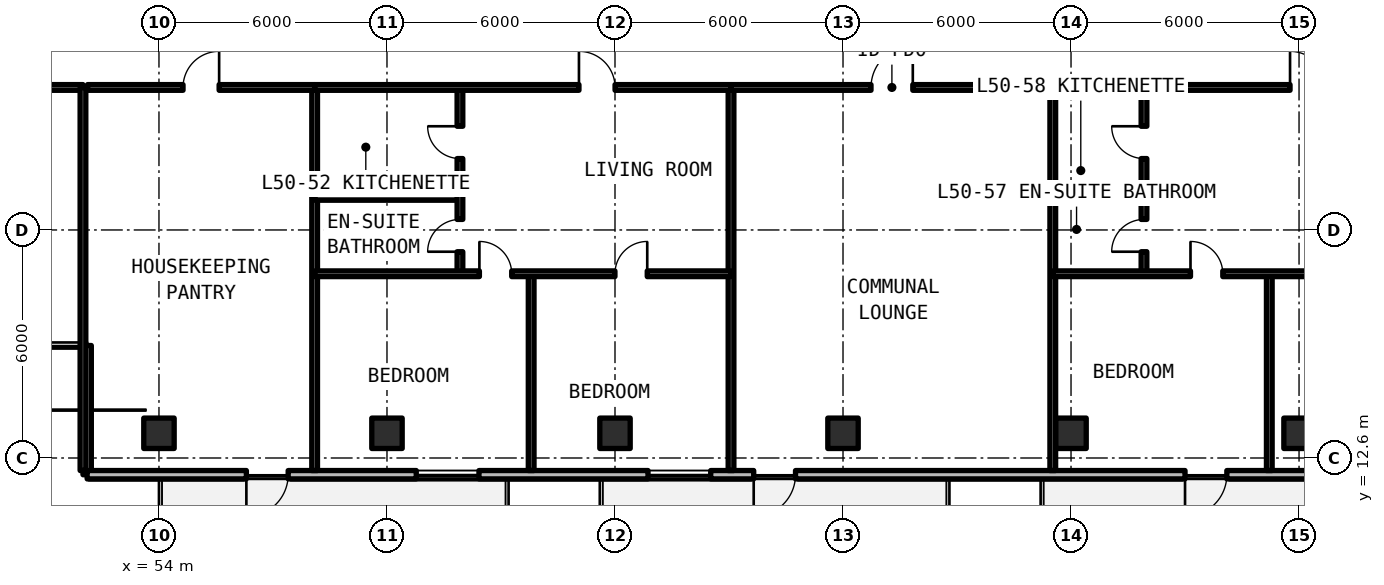
"""IFC4 building model, lengths in metres.
Left out: names, types, materials, properties, quantities, classifications, styles, units other than length and angle.
Written with IfcOpenShell. Run it as: python <this file> out.ifc"""

import sys

from ifc_helpers import new_model, si_unit, direction, frame, frame_2d, origin, origin_2d, place, context, subcontext, project, spatial, rectangle, extrude, element, fill, save


model = new_model("IFC4")
c1 = context("Model", 3, precision=1e-05, world=origin(), true_north=direction((0.0, 1.0)))
c2 = subcontext(c1, "Body", "Model", "MODEL_VIEW")
j1 = project(units=[si_unit("LENGTHUNIT", "METRE"), si_unit("PLANEANGLEUNIT", "RADIAN")], contexts=[c1])
p1 = place(None, origin())
s1 = spatial("IfcSite", under=j1, at=p1, CompositionType="ELEMENT")
p2 = place(p1, origin())
s2 = spatial("IfcBuilding", under=s1, at=p2, CompositionType="ELEMENT")
p3 = place(p2, frame((0.0, 0.0, 181.83)))
s3 = spatial("IfcBuildingStorey", under=s2, at=p3, CompositionType="ELEMENT", Elevation=181.83)
for number, where, z_axis, x_axis in (
    (1, (54.0, 13.25, 0.0), (0.0, 0.0, 1.0), (1.0, 0.0, 0.0)),
    (2, (60.0, 13.25, 0.0), (0.0, 0.0, 1.0), (1.0, 0.0, 0.0)),
    (3, (66.0, 13.25, 0.0), (0.0, 0.0, 1.0), (1.0, 0.0, 0.0)),
    (4, (72.0, 13.25, 0.0), (0.0, 0.0, 1.0), (1.0, 0.0, 0.0)),
    (5, (78.0, 13.25, 0.0), (0.0, 0.0, 1.0), (1.0, 0.0, 0.0)),
    (6, (84.0, 13.25, 0.0), (0.0, 0.0, 1.0), (1.0, 0.0, 0.0)),
):
    element("IfcColumn", number, at=place(p3, frame(where, z_axis=z_axis, x_axis=x_axis)), inside=s3, PredefinedType="COLUMN", context=c2, shape_type="SweptSolid", body=[
        extrude(rectangle(XDim=0.8, YDim=0.8, at=origin_2d()), origin(), (0.0, 0.0, 1.0), 3.3),
    ])
p4 = place(p3, frame((52.11, 15.56, 0.0), z_axis=(0.0, 0.0, 1.0), x_axis=(0.0, -1.0, 0.0)))
e7 = element("IfcWall", 7, at=p4, inside=s3, PredefinedType="SOLIDWALL", context=c2, shape_type="SweptSolid", body=[
    extrude(rectangle(XDim=3.4, YDim=0.22, at=frame_2d((1.7, 0.0))), origin(), (0.0, 0.0, 1.0), 3.08),
])
p5 = place(p3, frame((52.11, 12.16, 0.0), z_axis=(0.0, 0.0, 1.0), x_axis=(1.0, 0.0, 0.0)))
e8 = element("IfcWall", 8, at=p5, inside=s3, PredefinedType="SOLIDWALL", context=c2, shape_type="SweptSolid", body=[
    extrude(rectangle(XDim=43.244, YDim=0.22, at=frame_2d((21.622, 0.0))), origin(), (0.0, 0.0, 1.0), 3.08),
])
p6 = place(p5, frame((4.19, 0.0, 0.0)))
e9 = element("IfcOpeningElement", 9, at=p6, cuts=e8, PredefinedType="OPENING", context=c2, shape_type="SweptSolid", body=[
    extrude(rectangle(XDim=1.1, YDim=2.15, at=frame_2d((0.55, 1.075))), frame((0.0, 0.12, 0.0), z_axis=(0.0, -1.0, 0.0), x_axis=(1.0, 0.0, 0.0)), (0.0, 0.0, 1.0), 0.24),
])
p7 = place(p5, frame((17.54, 0.0, 0.0)))
e10 = element("IfcOpeningElement", 10, at=p7, cuts=e8, PredefinedType="OPENING", context=c2, shape_type="SweptSolid", body=[
    extrude(rectangle(XDim=1.1, YDim=2.15, at=frame_2d((0.55, 1.075))), frame((0.0, 0.12, 0.0), z_axis=(0.0, -1.0, 0.0), x_axis=(1.0, 0.0, 0.0)), (0.0, 0.0, 1.0), 0.24),
])
p8 = place(p5, frame((28.89, 0.0, 0.0)))
e11 = element("IfcOpeningElement", 11, at=p8, cuts=e8, PredefinedType="OPENING", context=c2, shape_type="SweptSolid", body=[
    extrude(rectangle(XDim=1.1, YDim=2.15, at=frame_2d((0.55, 1.075))), frame((0.0, 0.12, 0.0), z_axis=(0.0, -1.0, 0.0), x_axis=(1.0, 0.0, 0.0)), (0.0, 0.0, 1.0), 0.24),
])
p9 = place(p5, frame((8.66, 0.0, 0.78)))
e12 = element("IfcOpeningElement", 12, at=p9, cuts=e8, PredefinedType="OPENING", context=c2, shape_type="SweptSolid", body=[
    extrude(rectangle(XDim=1.65, YDim=1.66, at=frame_2d((0.825, 0.83))), frame((0.0, 0.12, 0.0), z_axis=(0.0, -1.0, 0.0), x_axis=(1.0, 0.0, 0.0)), (0.0, 0.0, 1.0), 0.24),
])
p10 = place(p5, frame((14.759, 0.0, 0.78)))
e13 = element("IfcOpeningElement", 13, at=p10, cuts=e8, PredefinedType="OPENING", context=c2, shape_type="SweptSolid", body=[
    extrude(rectangle(XDim=1.65, YDim=1.66, at=frame_2d((0.825, 0.83))), frame((0.0, 0.12, 0.0), z_axis=(0.0, -1.0, 0.0), x_axis=(1.0, 0.0, 0.0)), (0.0, 0.0, 1.0), 0.24),
])
p11 = place(p5, frame((32.902, 0.0, 0.78)))
e14 = element("IfcOpeningElement", 14, at=p11, cuts=e8, PredefinedType="OPENING", context=c2, shape_type="SweptSolid", body=[
    extrude(rectangle(XDim=1.65, YDim=1.66, at=frame_2d((0.825, 0.83))), frame((0.0, 0.12, 0.0), z_axis=(0.0, -1.0, 0.0), x_axis=(1.0, 0.0, 0.0)), (0.0, 0.0, 1.0), 0.24),
])
p12 = place(p5, frame((38.313, 0.0, 0.78)))
e15 = element("IfcOpeningElement", 15, at=p12, cuts=e8, PredefinedType="OPENING", context=c2, shape_type="SweptSolid", body=[
    extrude(rectangle(XDim=0.85, YDim=1.65, at=frame_2d((0.425, 0.825))), frame((0.0, 0.12, 0.0), z_axis=(0.0, -1.0, 0.0), x_axis=(1.0, 0.0, 0.0)), (0.0, 0.0, 1.0), 0.24),
])
p13 = place(p5, frame((40.615, 0.0, 0.78)))
e16 = element("IfcOpeningElement", 16, at=p13, cuts=e8, PredefinedType="OPENING", context=c2, shape_type="SweptSolid", body=[
    extrude(rectangle(XDim=1.65, YDim=1.66, at=frame_2d((0.825, 0.83))), frame((0.0, 0.12, 0.0), z_axis=(0.0, -1.0, 0.0), x_axis=(1.0, 0.0, 0.0)), (0.0, 0.0, 1.0), 0.24),
])
p14 = place(p3, frame((43.6, 22.35, 0.0), z_axis=(0.0, 0.0, 1.0), x_axis=(1.0, 0.0, 0.0)))
e17 = element("IfcWall", 17, at=p14, inside=s3, PredefinedType="SOLIDWALL", context=c2, shape_type="SweptSolid", body=[
    extrude(rectangle(XDim=8.4, YDim=0.15, at=frame_2d((4.2, 0.0))), origin(), (0.0, 0.0, 1.0), 2.35),
])
p15 = place(p14, frame((3.65, 0.0, 0.0)))
e18 = element("IfcOpeningElement", 18, at=p15, cuts=e17, PredefinedType="OPENING", context=c2, shape_type="SweptSolid", body=[
    extrude(rectangle(XDim=1.1, YDim=2.15, at=frame_2d((0.55, 1.075))), frame((0.0, 0.085, 0.0), z_axis=(0.0, -1.0, 0.0), x_axis=(1.0, 0.0, 0.0)), (0.0, 0.0, 1.0), 0.17),
])
for number, where, z_axis, x_axis in (
    (19, (52.0, 12.27, 0.0), (0.0, 0.0, 1.0), (0.0, 1.0, 0.0)),
    (20, (58.096, 12.27, 0.0), (0.0, 0.0, 1.0), (0.0, 1.0, 0.0)),
):
    element("IfcWall", number, at=place(p3, frame(where, z_axis=z_axis, x_axis=x_axis)), inside=s3, PredefinedType="SOLIDWALL", context=c2, shape_type="SweptSolid", body=[
        extrude(rectangle(XDim=10.08, YDim=0.15, at=frame_2d((5.04, 0.0))), origin(), (0.0, 0.0, 1.0), 2.35),
    ])
p16 = place(p3, frame((52.12, 22.35, 0.0), z_axis=(0.0, 0.0, 1.0), x_axis=(1.0, 0.0, 0.0)))
e21 = element("IfcWall", 21, at=p16, inside=s3, PredefinedType="SOLIDWALL", context=c2, shape_type="SweptSolid", body=[
    extrude(rectangle(XDim=5.976, YDim=0.15, at=frame_2d((2.988, 0.0))), origin(), (0.0, 0.0, 1.0), 2.35),
])
p17 = place(p16, frame((2.513, 0.0, 0.0)))
e22 = element("IfcOpeningElement", 22, at=p17, cuts=e21, PredefinedType="OPENING", context=c2, shape_type="SweptSolid", body=[
    extrude(rectangle(XDim=0.95, YDim=2.15, at=frame_2d((0.475, 1.075))), frame((0.0, 0.085, 0.0), z_axis=(0.0, -1.0, 0.0), x_axis=(1.0, 0.0, 0.0)), (0.0, 0.0, 1.0), 0.17),
])
p18 = place(p3, frame((69.053, 12.27, 0.0), z_axis=(0.0, 0.0, 1.0), x_axis=(0.0, 1.0, 0.0)))
e23 = element("IfcWall", 23, at=p18, inside=s3, PredefinedType="SOLIDWALL", context=c2, shape_type="SweptSolid", body=[
    extrude(rectangle(XDim=10.08, YDim=0.15, at=frame_2d((5.04, 0.0))), origin(), (0.0, 0.0, 1.0), 2.35),
])
p19 = place(p3, frame((58.096, 19.458, 0.0), z_axis=(0.0, 0.0, 1.0), x_axis=(1.0, 0.0, 0.0)))
e24 = element("IfcWall", 24, at=p19, inside=s3, PredefinedType="PARTITIONING", context=c2, shape_type="SweptSolid", body=[
    extrude(rectangle(XDim=3.823, YDim=0.15, at=frame_2d((1.912, 0.0))), origin(), (0.0, 0.0, 1.0), 2.35),
])
p20 = place(p3, frame((61.92, 17.448, 0.0), z_axis=(0.0, 0.0, 1.0), x_axis=(0.0, 1.0, 0.0)))
e25 = element("IfcWall", 25, at=p20, inside=s3, PredefinedType="PARTITIONING", context=c2, shape_type="SweptSolid", body=[
    extrude(rectangle(XDim=4.902, YDim=0.15, at=frame_2d((2.451, 0.0))), origin(), (0.0, 0.0, 1.0), 2.35),
])
p21 = place(p20, frame((0.58, 0.0, 0.0)))
e26 = element("IfcOpeningElement", 26, at=p21, cuts=e25, PredefinedType="OPENING", context=c2, shape_type="SweptSolid", body=[
    extrude(rectangle(XDim=0.85, YDim=2.1, at=frame_2d((0.425, 1.05))), frame((0.0, 0.085, 0.0), z_axis=(0.0, -1.0, 0.0), x_axis=(1.0, 0.0, 0.0)), (0.0, 0.0, 1.0), 0.17),
])
p22 = place(p20, frame((3.031, 0.0, 0.0)))
e27 = element("IfcOpeningElement", 27, at=p22, cuts=e25, PredefinedType="OPENING", context=c2, shape_type="SweptSolid", body=[
    extrude(rectangle(XDim=0.85, YDim=2.1, at=frame_2d((0.425, 1.05))), frame((0.0, 0.085, 0.0), z_axis=(0.0, -1.0, 0.0), x_axis=(1.0, 0.0, 0.0)), (0.0, 0.0, 1.0), 0.17),
])
p23 = place(p3, frame((63.794, 12.27, 0.0), z_axis=(0.0, 0.0, 1.0), x_axis=(0.0, 1.0, 0.0)))
e28 = element("IfcWall", 28, at=p23, inside=s3, PredefinedType="PARTITIONING", context=c2, shape_type="SweptSolid", body=[
    extrude(rectangle(XDim=5.178, YDim=0.15, at=frame_2d((2.589, 0.0))), origin(), (0.0, 0.0, 1.0), 2.35),
])
p24 = place(p3, frame((58.096, 17.448, 0.0), z_axis=(0.0, 0.0, 1.0), x_axis=(1.0, 0.0, 0.0)))
e29 = element("IfcWall", 29, at=p24, inside=s3, PredefinedType="PARTITIONING", context=c2, shape_type="SweptSolid", body=[
    extrude(rectangle(XDim=10.957, YDim=0.15, at=frame_2d((5.479, 0.0))), origin(), (0.0, 0.0, 1.0), 2.35),
])
p25 = place(p24, frame((4.335, 0.0, 0.0)))
e30 = element("IfcOpeningElement", 30, at=p25, cuts=e29, PredefinedType="OPENING", context=c2, shape_type="SweptSolid", body=[
    extrude(rectangle(XDim=0.85, YDim=2.1, at=frame_2d((0.425, 1.05))), frame((0.0, 0.085, 0.0), z_axis=(0.0, -1.0, 0.0), x_axis=(1.0, 0.0, 0.0)), (0.0, 0.0, 1.0), 0.17),
])
p26 = place(p24, frame((7.902, 0.0, 0.0)))
e31 = element("IfcOpeningElement", 31, at=p26, cuts=e29, PredefinedType="OPENING", context=c2, shape_type="SweptSolid", body=[
    extrude(rectangle(XDim=0.85, YDim=2.1, at=frame_2d((0.425, 1.05))), frame((0.0, 0.085, 0.0), z_axis=(0.0, -1.0, 0.0), x_axis=(1.0, 0.0, 0.0)), (0.0, 0.0, 1.0), 0.17),
])
p27 = place(p3, frame((58.096, 22.35, 0.0), z_axis=(0.0, 0.0, 1.0), x_axis=(1.0, 0.0, 0.0)))
e32 = element("IfcWall", 32, at=p27, inside=s3, PredefinedType="SOLIDWALL", context=c2, shape_type="SweptSolid", body=[
    extrude(rectangle(XDim=10.957, YDim=0.15, at=frame_2d((5.479, 0.0))), origin(), (0.0, 0.0, 1.0), 2.35),
])
p28 = place(p27, frame((6.955, 0.0, 0.0)))
e33 = element("IfcOpeningElement", 33, at=p28, cuts=e32, PredefinedType="OPENING", context=c2, shape_type="SweptSolid", body=[
    extrude(rectangle(XDim=0.95, YDim=2.15, at=frame_2d((0.475, 1.075))), frame((0.0, 0.085, 0.0), z_axis=(0.0, -1.0, 0.0), x_axis=(1.0, 0.0, 0.0)), (0.0, 0.0, 1.0), 0.17),
])
p29 = place(p3, frame((77.52, 12.27, 0.0), z_axis=(0.0, 0.0, 1.0), x_axis=(0.0, 1.0, 0.0)))
e34 = element("IfcWall", 34, at=p29, inside=s3, PredefinedType="SOLIDWALL", context=c2, shape_type="SweptSolid", body=[
    extrude(rectangle(XDim=10.08, YDim=0.15, at=frame_2d((5.04, 0.0))), origin(), (0.0, 0.0, 1.0), 2.35),
])
p30 = place(p3, frame((69.053, 22.35, 0.0), z_axis=(0.0, 0.0, 1.0), x_axis=(1.0, 0.0, 0.0)))
e35 = element("IfcWall", 35, at=p30, inside=s3, PredefinedType="SOLIDWALL", context=c2, shape_type="SweptSolid", body=[
    extrude(rectangle(XDim=8.467, YDim=0.15, at=frame_2d((4.233, 0.0))), origin(), (0.0, 0.0, 1.0), 2.35),
])
p31 = place(p30, frame((3.683, 0.0, 0.0)))
e36 = element("IfcOpeningElement", 36, at=p31, cuts=e35, PredefinedType="OPENING", context=c2, shape_type="SweptSolid", body=[
    extrude(rectangle(XDim=1.1, YDim=2.15, at=frame_2d((0.55, 1.075))), frame((0.0, 0.085, 0.0), z_axis=(0.0, -1.0, 0.0), x_axis=(1.0, 0.0, 0.0)), (0.0, 0.0, 1.0), 0.17),
])
p32 = place(p3, frame((77.52, 19.458, 0.0), z_axis=(0.0, 0.0, 1.0), x_axis=(1.0, 0.0, 0.0)))
e37 = element("IfcWall", 37, at=p32, inside=s3, PredefinedType="PARTITIONING", context=c2, shape_type="SweptSolid", body=[
    extrude(rectangle(XDim=2.4, YDim=0.15, at=frame_2d((1.2, 0.0))), origin(), (0.0, 0.0, 1.0), 2.35),
])
p33 = place(p3, frame((79.92, 17.448, 0.0), z_axis=(0.0, 0.0, 1.0), x_axis=(0.0, 1.0, 0.0)))
e38 = element("IfcWall", 38, at=p33, inside=s3, PredefinedType="PARTITIONING", context=c2, shape_type="SweptSolid", body=[
    extrude(rectangle(XDim=4.902, YDim=0.15, at=frame_2d((2.451, 0.0))), origin(), (0.0, 0.0, 1.0), 2.35),
])
p34 = place(p33, frame((0.58, 0.0, 0.0)))
e39 = element("IfcOpeningElement", 39, at=p34, cuts=e38, PredefinedType="OPENING", context=c2, shape_type="SweptSolid", body=[
    extrude(rectangle(XDim=0.85, YDim=2.1, at=frame_2d((0.425, 1.05))), frame((0.0, 0.085, 0.0), z_axis=(0.0, -1.0, 0.0), x_axis=(1.0, 0.0, 0.0)), (0.0, 0.0, 1.0), 0.17),
])
p35 = place(p33, frame((3.031, 0.0, 0.0)))
e40 = element("IfcOpeningElement", 40, at=p35, cuts=e38, PredefinedType="OPENING", context=c2, shape_type="SweptSolid", body=[
    extrude(rectangle(XDim=0.85, YDim=2.1, at=frame_2d((0.425, 1.05))), frame((0.0, 0.085, 0.0), z_axis=(0.0, -1.0, 0.0), x_axis=(1.0, 0.0, 0.0)), (0.0, 0.0, 1.0), 0.17),
])
p36 = place(p3, frame((83.217, 12.27, 0.0), z_axis=(0.0, 0.0, 1.0), x_axis=(0.0, 1.0, 0.0)))
e41 = element("IfcWall", 41, at=p36, inside=s3, PredefinedType="PARTITIONING", context=c2, shape_type="SweptSolid", body=[
    extrude(rectangle(XDim=5.178, YDim=0.15, at=frame_2d((2.589, 0.0))), origin(), (0.0, 0.0, 1.0), 2.35),
])
p37 = place(p3, frame((77.52, 17.448, 0.0), z_axis=(0.0, 0.0, 1.0), x_axis=(1.0, 0.0, 0.0)))
e42 = element("IfcWall", 42, at=p37, inside=s3, PredefinedType="PARTITIONING", context=c2, shape_type="SweptSolid", body=[
    extrude(rectangle(XDim=10.957, YDim=0.15, at=frame_2d((5.479, 0.0))), origin(), (0.0, 0.0, 1.0), 2.35),
])
p38 = place(p37, frame((3.624, 0.0, 0.0)))
e43 = element("IfcOpeningElement", 43, at=p38, cuts=e42, PredefinedType="OPENING", context=c2, shape_type="SweptSolid", body=[
    extrude(rectangle(XDim=0.85, YDim=2.1, at=frame_2d((0.425, 1.05))), frame((0.0, 0.085, 0.0), z_axis=(0.0, -1.0, 0.0), x_axis=(1.0, 0.0, 0.0)), (0.0, 0.0, 1.0), 0.17),
])
p39 = place(p37, frame((7.902, 0.0, 0.0)))
e44 = element("IfcOpeningElement", 44, at=p39, cuts=e42, PredefinedType="OPENING", context=c2, shape_type="SweptSolid", body=[
    extrude(rectangle(XDim=0.85, YDim=2.1, at=frame_2d((0.425, 1.05))), frame((0.0, 0.085, 0.0), z_axis=(0.0, -1.0, 0.0), x_axis=(1.0, 0.0, 0.0)), (0.0, 0.0, 1.0), 0.17),
])
p40 = place(p3, frame((77.52, 22.35, 0.0), z_axis=(0.0, 0.0, 1.0), x_axis=(1.0, 0.0, 0.0)))
e45 = element("IfcWall", 45, at=p40, inside=s3, PredefinedType="SOLIDWALL", context=c2, shape_type="SweptSolid", body=[
    extrude(rectangle(XDim=10.957, YDim=0.15, at=frame_2d((5.479, 0.0))), origin(), (0.0, 0.0, 1.0), 2.35),
])
p41 = place(p40, frame((6.243, 0.0, 0.0)))
e46 = element("IfcOpeningElement", 46, at=p41, cuts=e45, PredefinedType="OPENING", context=c2, shape_type="SweptSolid", body=[
    extrude(rectangle(XDim=0.95, YDim=2.15, at=frame_2d((0.475, 1.075))), frame((0.0, 0.085, 0.0), z_axis=(0.0, -1.0, 0.0), x_axis=(1.0, 0.0, 0.0)), (0.0, 0.0, 1.0), 0.17),
])
p42 = place(p6, frame((1.1, 0.0, 0.0), z_axis=(0.0, 0.0, 1.0), x_axis=(-1.0, 0.0, 0.0)))
e47 = element("IfcDoor", 47, at=p42, inside=s3, OperationType="SINGLE_SWING_RIGHT", PredefinedType="DOOR", context=c2, shape_type="SweptSolid", body=[
    extrude(rectangle(XDim=1.1, YDim=2.15, at=frame_2d((0.55, 1.075))), frame((0.0, 0.025, 0.0), z_axis=(0.0, -1.0, 0.0), x_axis=(1.0, 0.0, 0.0)), (0.0, 0.0, 1.0), 0.05),
])
fill(e9, e47)
p43 = place(p7, frame((1.1, 0.0, 0.0), z_axis=(0.0, 0.0, 1.0), x_axis=(-1.0, 0.0, 0.0)))
e48 = element("IfcDoor", 48, at=p43, inside=s3, OperationType="SINGLE_SWING_LEFT", PredefinedType="DOOR", context=c2, shape_type="SweptSolid", body=[
    extrude(rectangle(XDim=1.1, YDim=2.15, at=frame_2d((0.55, 1.075))), frame((0.0, 0.025, 0.0), z_axis=(0.0, -1.0, 0.0), x_axis=(1.0, 0.0, 0.0)), (0.0, 0.0, 1.0), 0.05),
])
fill(e10, e48)
p44 = place(p8, frame((1.1, 0.0, 0.0), z_axis=(0.0, 0.0, 1.0), x_axis=(-1.0, 0.0, 0.0)))
e49 = element("IfcDoor", 49, at=p44, inside=s3, OperationType="SINGLE_SWING_RIGHT", PredefinedType="DOOR", context=c2, shape_type="SweptSolid", body=[
    extrude(rectangle(XDim=1.1, YDim=2.15, at=frame_2d((0.55, 1.075))), frame((0.0, 0.025, 0.0), z_axis=(0.0, -1.0, 0.0), x_axis=(1.0, 0.0, 0.0)), (0.0, 0.0, 1.0), 0.05),
])
fill(e11, e49)
p45 = place(p9, origin())
e50 = element("IfcWindow", 50, at=p45, inside=s3, PartitioningType="SINGLE_PANEL", PredefinedType="WINDOW", context=c2, shape_type="SweptSolid", body=[
    extrude(rectangle(XDim=1.65, YDim=1.66, at=frame_2d((0.825, 0.83))), frame((0.0, 0.03, 0.0), z_axis=(0.0, -1.0, 0.0), x_axis=(1.0, 0.0, 0.0)), (0.0, 0.0, 1.0), 0.06),
])
fill(e12, e50)
p46 = place(p10, origin())
e51 = element("IfcWindow", 51, at=p46, inside=s3, PartitioningType="SINGLE_PANEL", PredefinedType="WINDOW", context=c2, shape_type="SweptSolid", body=[
    extrude(rectangle(XDim=1.65, YDim=1.66, at=frame_2d((0.825, 0.83))), frame((0.0, 0.03, 0.0), z_axis=(0.0, -1.0, 0.0), x_axis=(1.0, 0.0, 0.0)), (0.0, 0.0, 1.0), 0.06),
])
fill(e13, e51)
p47 = place(p17, origin())
e52 = element("IfcDoor", 52, at=p47, inside=s3, OperationType="SINGLE_SWING_RIGHT", PredefinedType="DOOR", context=c2, shape_type="SweptSolid", body=[
    extrude(rectangle(XDim=0.95, YDim=2.15, at=frame_2d((0.475, 1.075))), frame((0.0, 0.025, 0.0), z_axis=(0.0, -1.0, 0.0), x_axis=(1.0, 0.0, 0.0)), (0.0, 0.0, 1.0), 0.05),
])
fill(e22, e52)
p48 = place(p21, origin())
e53 = element("IfcDoor", 53, at=p48, inside=s3, OperationType="SINGLE_SWING_LEFT", PredefinedType="DOOR", context=c2, shape_type="SweptSolid", body=[
    extrude(rectangle(XDim=0.85, YDim=2.1, at=frame_2d((0.425, 1.05))), frame((0.0, 0.025, 0.0), z_axis=(0.0, -1.0, 0.0), x_axis=(1.0, 0.0, 0.0)), (0.0, 0.0, 1.0), 0.05),
])
fill(e26, e53)
p49 = place(p22, origin())
e54 = element("IfcDoor", 54, at=p49, inside=s3, OperationType="SINGLE_SWING_RIGHT", PredefinedType="DOOR", context=c2, shape_type="SweptSolid", body=[
    extrude(rectangle(XDim=0.85, YDim=2.1, at=frame_2d((0.425, 1.05))), frame((0.0, 0.025, 0.0), z_axis=(0.0, -1.0, 0.0), x_axis=(1.0, 0.0, 0.0)), (0.0, 0.0, 1.0), 0.05),
])
fill(e27, e54)
p50 = place(p25, origin())
e55 = element("IfcDoor", 55, at=p50, inside=s3, OperationType="SINGLE_SWING_LEFT", PredefinedType="DOOR", context=c2, shape_type="SweptSolid", body=[
    extrude(rectangle(XDim=0.85, YDim=2.1, at=frame_2d((0.425, 1.05))), frame((0.0, 0.025, 0.0), z_axis=(0.0, -1.0, 0.0), x_axis=(1.0, 0.0, 0.0)), (0.0, 0.0, 1.0), 0.05),
])
fill(e30, e55)
p51 = place(p26, origin())
e56 = element("IfcDoor", 56, at=p51, inside=s3, OperationType="SINGLE_SWING_RIGHT", PredefinedType="DOOR", context=c2, shape_type="SweptSolid", body=[
    extrude(rectangle(XDim=0.85, YDim=2.1, at=frame_2d((0.425, 1.05))), frame((0.0, 0.025, 0.0), z_axis=(0.0, -1.0, 0.0), x_axis=(1.0, 0.0, 0.0)), (0.0, 0.0, 1.0), 0.05),
])
fill(e31, e56)
p52 = place(p28, origin())
e57 = element("IfcDoor", 57, at=p52, inside=s3, OperationType="SINGLE_SWING_LEFT", PredefinedType="DOOR", context=c2, shape_type="SweptSolid", body=[
    extrude(rectangle(XDim=0.95, YDim=2.15, at=frame_2d((0.475, 1.075))), frame((0.0, 0.025, 0.0), z_axis=(0.0, -1.0, 0.0), x_axis=(1.0, 0.0, 0.0)), (0.0, 0.0, 1.0), 0.05),
])
fill(e33, e57)
p53 = place(p31, origin())
e58 = element("IfcDoor", 58, at=p53, inside=s3, OperationType="SINGLE_SWING_RIGHT", PredefinedType="DOOR", context=c2, shape_type="SweptSolid", body=[
    extrude(rectangle(XDim=1.1, YDim=2.15, at=frame_2d((0.55, 1.075))), frame((0.0, 0.025, 0.0), z_axis=(0.0, -1.0, 0.0), x_axis=(1.0, 0.0, 0.0)), (0.0, 0.0, 1.0), 0.05),
])
fill(e36, e58)
p54 = place(p34, origin())
e59 = element("IfcDoor", 59, at=p54, inside=s3, OperationType="SINGLE_SWING_LEFT", PredefinedType="DOOR", context=c2, shape_type="SweptSolid", body=[
    extrude(rectangle(XDim=0.85, YDim=2.1, at=frame_2d((0.425, 1.05))), frame((0.0, 0.025, 0.0), z_axis=(0.0, -1.0, 0.0), x_axis=(1.0, 0.0, 0.0)), (0.0, 0.0, 1.0), 0.05),
])
fill(e39, e59)
p55 = place(p35, origin())
e60 = element("IfcDoor", 60, at=p55, inside=s3, OperationType="SINGLE_SWING_RIGHT", PredefinedType="DOOR", context=c2, shape_type="SweptSolid", body=[
    extrude(rectangle(XDim=0.85, YDim=2.1, at=frame_2d((0.425, 1.05))), frame((0.0, 0.025, 0.0), z_axis=(0.0, -1.0, 0.0), x_axis=(1.0, 0.0, 0.0)), (0.0, 0.0, 1.0), 0.05),
])
fill(e40, e60)
p56 = place(p38, origin())
e61 = element("IfcDoor", 61, at=p56, inside=s3, OperationType="SINGLE_SWING_LEFT", PredefinedType="DOOR", context=c2, shape_type="SweptSolid", body=[
    extrude(rectangle(XDim=0.85, YDim=2.1, at=frame_2d((0.425, 1.05))), frame((0.0, 0.025, 0.0), z_axis=(0.0, -1.0, 0.0), x_axis=(1.0, 0.0, 0.0)), (0.0, 0.0, 1.0), 0.05),
])
fill(e43, e61)
p57 = place(p41, origin())
e62 = element("IfcDoor", 62, at=p57, inside=s3, OperationType="SINGLE_SWING_LEFT", PredefinedType="DOOR", context=c2, shape_type="SweptSolid", body=[
    extrude(rectangle(XDim=0.95, YDim=2.15, at=frame_2d((0.475, 1.075))), frame((0.0, 0.025, 0.0), z_axis=(0.0, -1.0, 0.0), x_axis=(1.0, 0.0, 0.0)), (0.0, 0.0, 1.0), 0.05),
])
fill(e46, e62)
save(model, sys.argv[1])
